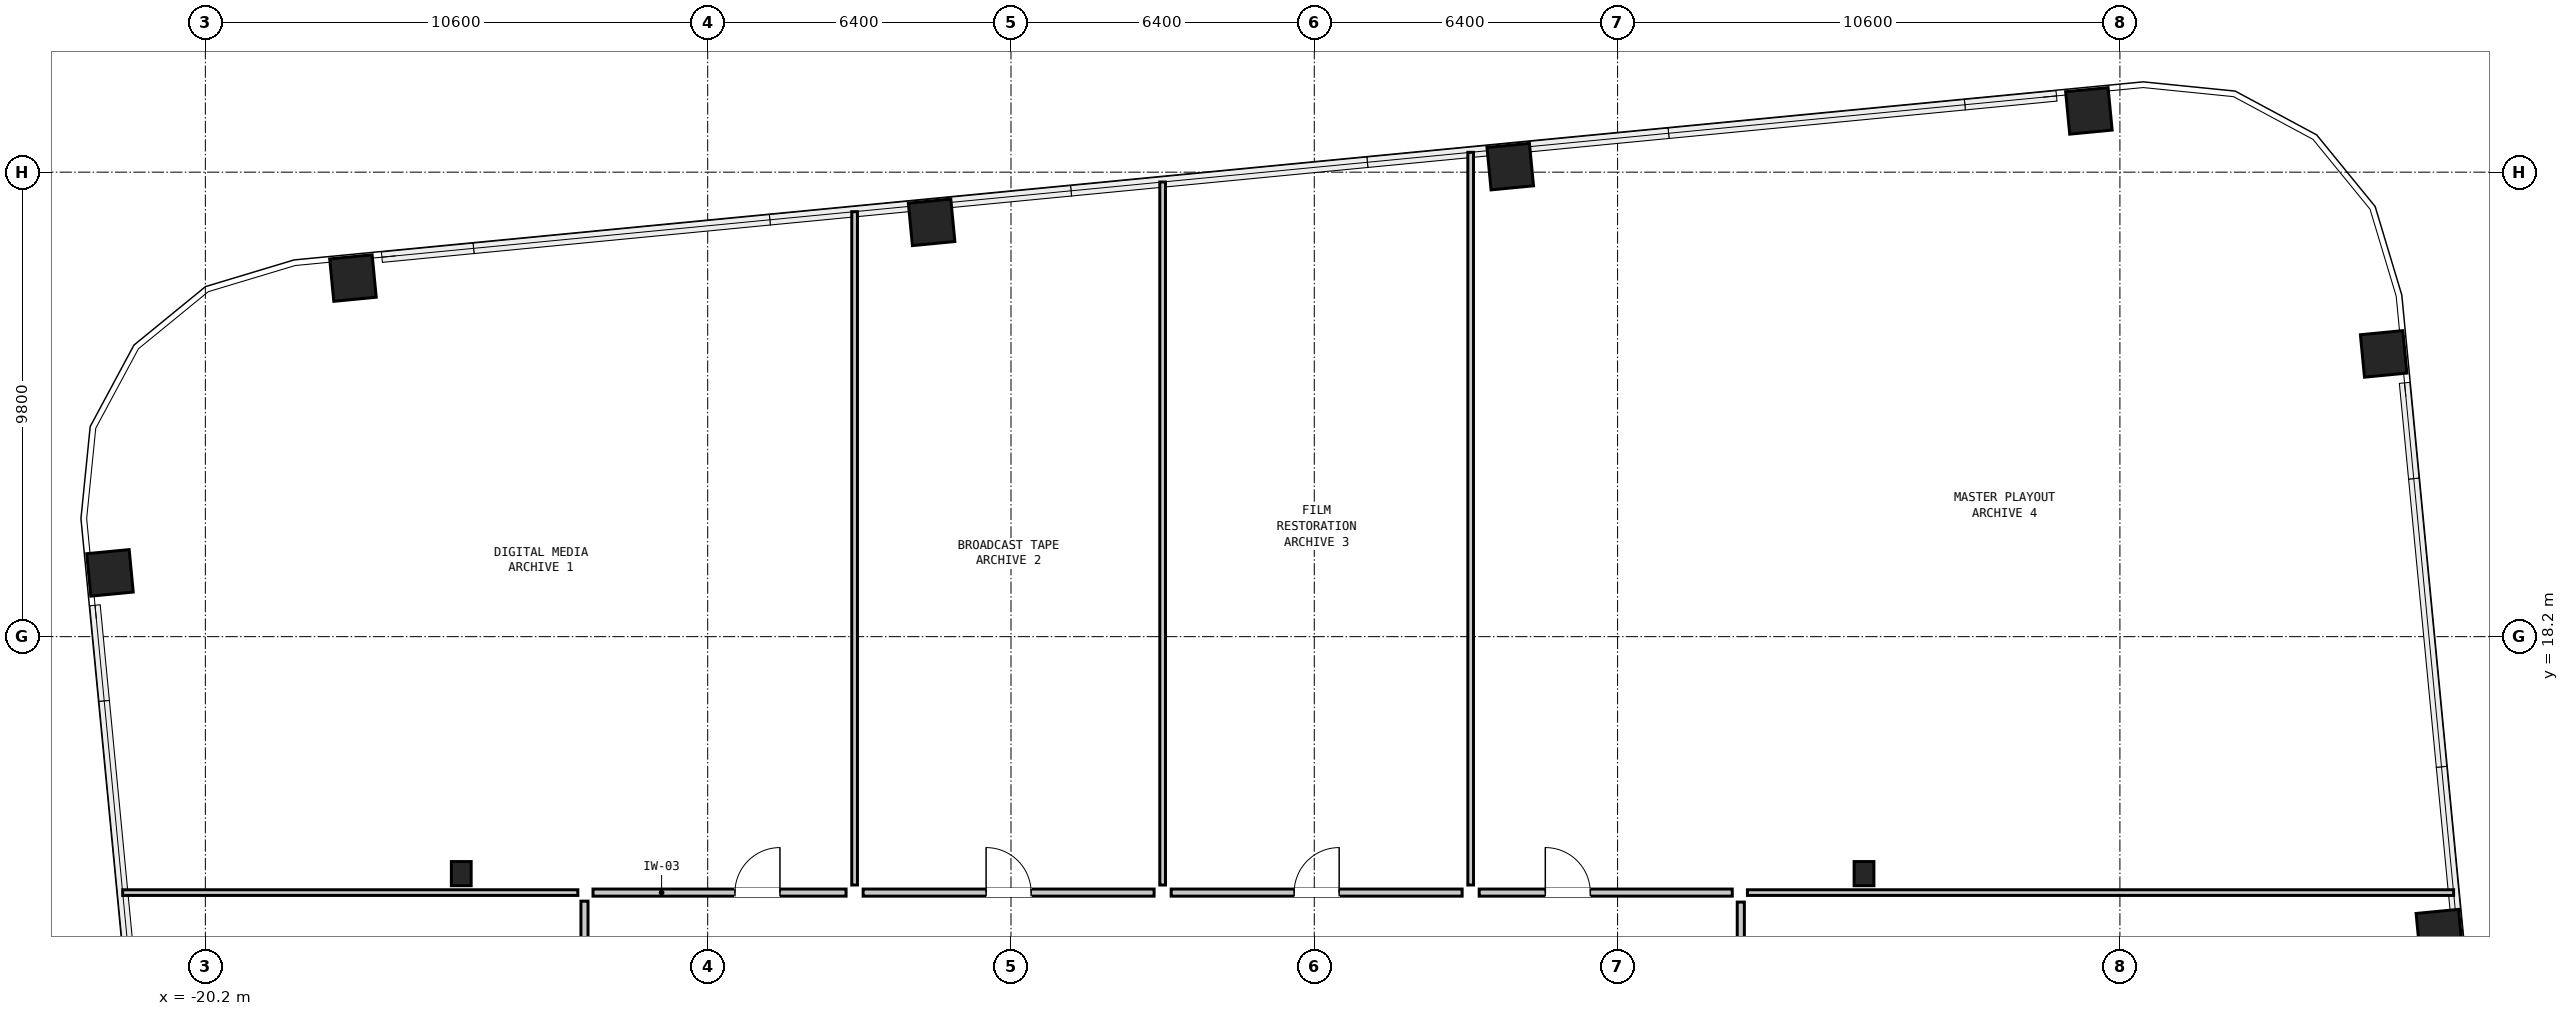
"""IFC4 building model, lengths in metres.
Left out: names, types, materials, properties, quantities, classifications, styles, units other than length and angle.
Written with IfcOpenShell. Run it as: python <this file> out.ifc"""

import sys

from ifc_helpers import new_model, si_unit, direction, frame, frame_2d, origin, origin_2d, place, context, subcontext, project, spatial, rectangle, hollow_rectangle, i_section, extrude, element, fill, save


model = new_model("IFC4")
c1 = context("Model", 3, precision=1e-05, world=origin(), true_north=direction((0.0, 1.0)))
c2 = subcontext(c1, "Body", "Model", "MODEL_VIEW")
j1 = project(units=[si_unit("LENGTHUNIT", "METRE"), si_unit("PLANEANGLEUNIT", "RADIAN")], contexts=[c1])
p1 = place(None, origin())
s1 = spatial("IfcSite", under=j1, at=p1, CompositionType="ELEMENT")
p2 = place(p1, origin())
s2 = spatial("IfcBuilding", under=s1, at=p2, CompositionType="ELEMENT")
p3 = place(p2, frame((0.0, 0.0, 90.8)))
s3 = spatial("IfcBuildingStorey", under=s2, at=p3, CompositionType="ELEMENT", Elevation=90.8)
for number, where, z_axis, x_axis in (
    (1, (26.941, 11.955, 0.0), (0.0, 0.0, 1.0), (-0.096, 0.995, 0.0)),
    (2, (25.765, 24.165, 0.0), (0.0, 0.0, 1.0), (-0.096, 0.995, 0.0)),
    (3, (19.545, 29.292, 0.0), (0.0, 0.0, 1.0), (0.995, 0.096, 0.0)),
    (4, (7.335, 28.117, 0.0), (0.0, 0.0, 1.0), (0.995, 0.096, 0.0)),
    (5, (-4.875, 26.941, 0.0), (0.0, 0.0, 1.0), (0.995, 0.096, 0.0)),
    (6, (-17.085, 25.765, 0.0), (0.0, 0.0, 1.0), (0.995, 0.096, 0.0)),
    (7, (-22.213, 19.545, 0.0), (0.0, 0.0, 1.0), (-0.096, 0.995, 0.0)),
):
    element("IfcColumn", number, at=place(p3, frame(where, z_axis=z_axis, x_axis=x_axis)), inside=s3, PredefinedType="COLUMN", context=c2, shape_type="SweptSolid", body=[
        extrude(hollow_rectangle(XDim=0.9, YDim=0.9, WallThickness=0.055, at=origin_2d()), origin(), (0.0, 0.0, 1.0), 3.05),
    ])
for number, where, z_axis, x_axis in (
    (8, (-14.8, 13.2, 0.0), (0.0, 0.0, 1.0), (1.0, 0.0, 0.0)),
    (9, (14.8, 13.2, 0.0), (0.0, 0.0, 1.0), (1.0, 0.0, 0.0)),
):
    element("IfcColumn", number, at=place(p3, frame(where, z_axis=z_axis, x_axis=x_axis)), inside=s3, PredefinedType="COLUMN", context=c2, shape_type="SweptSolid", body=[
        extrude(i_section(OverallWidth=0.418, OverallDepth=0.51, WebThickness=0.042, FlangeThickness=0.068, at=origin_2d()), origin(), (0.0, 0.0, 1.0), 3.05),
    ])
p4 = place(p3, frame((-21.945, 12.8, 0.0), z_axis=(0.0, 0.0, 1.0), x_axis=(1.0, 0.0, 0.0)))
e10 = element("IfcWall", 10, at=p4, inside=s3, PredefinedType="PARTITIONING", context=c2, shape_type="SweptSolid", body=[
    extrude(rectangle(XDim=9.605, YDim=0.12, at=frame_2d((4.802, 0.0))), origin(), (0.0, 0.0, 1.0), 2.83),
])
p5 = place(p3, frame((12.34, 12.8, 0.0), z_axis=(0.0, 0.0, 1.0), x_axis=(1.0, 0.0, 0.0)))
e11 = element("IfcWall", 11, at=p5, inside=s3, PredefinedType="PARTITIONING", context=c2, shape_type="SweptSolid", body=[
    extrude(rectangle(XDim=14.902, YDim=0.12, at=frame_2d((7.451, 0.0))), origin(), (0.0, 0.0, 1.0), 2.83),
])
p6 = place(p3, frame((-6.5, 12.96, 0.0), z_axis=(0.0, 0.0, 1.0), x_axis=(0.0, 1.0, 0.0)))
e12 = element("IfcWall", 12, at=p6, inside=s3, PredefinedType="PARTITIONING", context=c2, shape_type="SweptSolid", body=[
    extrude(rectangle(XDim=14.207, YDim=0.12, at=frame_2d((7.103, 0.0))), origin(), (0.0, 0.0, 1.0), 2.274),
])
p7 = place(p3, frame((0.0, 12.96, 0.0), z_axis=(0.0, 0.0, 1.0), x_axis=(0.0, 1.0, 0.0)))
e13 = element("IfcWall", 13, at=p7, inside=s3, PredefinedType="PARTITIONING", context=c2, shape_type="SweptSolid", body=[
    extrude(rectangle(XDim=14.833, YDim=0.12, at=frame_2d((7.416, 0.0))), origin(), (0.0, 0.0, 1.0), 2.274),
])
p8 = place(p3, frame((6.5, 12.96, 0.0), z_axis=(0.0, 0.0, 1.0), x_axis=(0.0, 1.0, 0.0)))
e14 = element("IfcWall", 14, at=p8, inside=s3, PredefinedType="PARTITIONING", context=c2, shape_type="SweptSolid", body=[
    extrude(rectangle(XDim=15.458, YDim=0.12, at=frame_2d((7.729, 0.0))), origin(), (0.0, 0.0, 1.0), 2.274),
])
p9 = place(p3, frame((-12.02, 12.8, 0.0), z_axis=(0.0, 0.0, 1.0), x_axis=(1.0, 0.0, 0.0)))
e15 = element("IfcWall", 15, at=p9, inside=s3, PredefinedType="PARTITIONING", context=c2, shape_type="SweptSolid", body=[
    extrude(rectangle(XDim=5.34, YDim=0.15, at=frame_2d((2.67, 0.0))), origin(), (0.0, 0.0, 1.0), 2.83),
])
p10 = place(p9, frame((2.995, 0.0, 0.0)))
e16 = element("IfcOpeningElement", 16, at=p10, cuts=e15, PredefinedType="OPENING", context=c2, shape_type="SweptSolid", body=[
    extrude(rectangle(XDim=0.95, YDim=2.1, at=frame_2d((0.475, 1.05))), frame((0.0, 0.087, 0.0), z_axis=(0.0, -1.0, 0.0), x_axis=(1.0, 0.0, 0.0)), (0.0, 0.0, 1.0), 0.174),
])
p11 = place(p3, frame((-6.32, 12.8, 0.0), z_axis=(0.0, 0.0, 1.0), x_axis=(1.0, 0.0, 0.0)))
e17 = element("IfcWall", 17, at=p11, inside=s3, PredefinedType="PARTITIONING", context=c2, shape_type="SweptSolid", body=[
    extrude(rectangle(XDim=6.14, YDim=0.15, at=frame_2d((3.07, 0.0))), origin(), (0.0, 0.0, 1.0), 2.83),
])
p12 = place(p11, frame((2.595, 0.0, 0.0)))
e18 = element("IfcOpeningElement", 18, at=p12, cuts=e17, PredefinedType="OPENING", context=c2, shape_type="SweptSolid", body=[
    extrude(rectangle(XDim=0.95, YDim=2.1, at=frame_2d((0.475, 1.05))), frame((0.0, 0.087, 0.0), z_axis=(0.0, -1.0, 0.0), x_axis=(1.0, 0.0, 0.0)), (0.0, 0.0, 1.0), 0.174),
])
p13 = place(p3, frame((0.18, 12.8, 0.0), z_axis=(0.0, 0.0, 1.0), x_axis=(1.0, 0.0, 0.0)))
e19 = element("IfcWall", 19, at=p13, inside=s3, PredefinedType="PARTITIONING", context=c2, shape_type="SweptSolid", body=[
    extrude(rectangle(XDim=6.14, YDim=0.15, at=frame_2d((3.07, 0.0))), origin(), (0.0, 0.0, 1.0), 2.83),
])
p14 = place(p13, frame((2.595, 0.0, 0.0)))
e20 = element("IfcOpeningElement", 20, at=p14, cuts=e19, PredefinedType="OPENING", context=c2, shape_type="SweptSolid", body=[
    extrude(rectangle(XDim=0.95, YDim=2.1, at=frame_2d((0.475, 1.05))), frame((0.0, 0.087, 0.0), z_axis=(0.0, -1.0, 0.0), x_axis=(1.0, 0.0, 0.0)), (0.0, 0.0, 1.0), 0.174),
])
p15 = place(p3, frame((6.68, 12.8, 0.0), z_axis=(0.0, 0.0, 1.0), x_axis=(1.0, 0.0, 0.0)))
e21 = element("IfcWall", 21, at=p15, inside=s3, PredefinedType="PARTITIONING", context=c2, shape_type="SweptSolid", body=[
    extrude(rectangle(XDim=5.34, YDim=0.15, at=frame_2d((2.67, 0.0))), origin(), (0.0, 0.0, 1.0), 2.83),
])
p16 = place(p15, frame((1.395, 0.0, 0.0)))
e22 = element("IfcOpeningElement", 22, at=p16, cuts=e21, PredefinedType="OPENING", context=c2, shape_type="SweptSolid", body=[
    extrude(rectangle(XDim=0.95, YDim=2.1, at=frame_2d((0.475, 1.05))), frame((0.0, 0.087, 0.0), z_axis=(0.0, -1.0, 0.0), x_axis=(1.0, 0.0, 0.0)), (0.0, 0.0, 1.0), 0.174),
])
p17 = place(p3, frame((-12.2, 3.68, 0.0), z_axis=(0.0, 0.0, 1.0), x_axis=(0.0, 1.0, 0.0)))
e23 = element("IfcWall", 23, at=p17, inside=s3, PredefinedType="PARTITIONING", context=c2, shape_type="SweptSolid", body=[
    extrude(rectangle(XDim=8.94, YDim=0.15, at=frame_2d((4.47, 0.0))), origin(), (0.0, 0.0, 1.0), 2.83),
])
p18 = place(p17, frame((3.995, 0.0, 0.0)))
e24 = element("IfcOpeningElement", 24, at=p18, cuts=e23, PredefinedType="OPENING", context=c2, shape_type="SweptSolid", body=[
    extrude(rectangle(XDim=0.95, YDim=2.1, at=frame_2d((0.475, 1.05))), frame((0.0, 0.087, 0.0), z_axis=(0.0, -1.0, 0.0), x_axis=(1.0, 0.0, 0.0)), (0.0, 0.0, 1.0), 0.174),
])
p19 = place(p3, frame((12.2, 3.8, 0.0), z_axis=(0.0, 0.0, 1.0), x_axis=(0.0, 1.0, 0.0)))
e25 = element("IfcWall", 25, at=p19, inside=s3, PredefinedType="PARTITIONING", context=c2, shape_type="SweptSolid", body=[
    extrude(rectangle(XDim=8.8, YDim=0.15, at=frame_2d((4.4, 0.0))), origin(), (0.0, 0.0, 1.0), 2.83),
])
p20 = place(p19, frame((3.925, 0.0, 0.0)))
e26 = element("IfcOpeningElement", 26, at=p20, cuts=e25, PredefinedType="OPENING", context=c2, shape_type="SweptSolid", body=[
    extrude(rectangle(XDim=0.95, YDim=2.1, at=frame_2d((0.475, 1.05))), frame((0.0, 0.087, 0.0), z_axis=(0.0, -1.0, 0.0), x_axis=(1.0, 0.0, 0.0)), (0.0, 0.0, 1.0), 0.174),
])
p21 = place(p10, origin())
e27 = element("IfcDoor", 27, at=p21, inside=s3, OperationType="SINGLE_SWING_RIGHT", PredefinedType="DOOR", context=c2, shape_type="SweptSolid", body=[
    extrude(rectangle(XDim=0.95, YDim=2.1, at=frame_2d((0.475, 1.05))), frame((0.0, 0.025, 0.0), z_axis=(0.0, -1.0, 0.0), x_axis=(1.0, 0.0, 0.0)), (0.0, 0.0, 1.0), 0.05),
])
fill(e16, e27)
p22 = place(p12, origin())
e28 = element("IfcDoor", 28, at=p22, inside=s3, OperationType="SINGLE_SWING_LEFT", PredefinedType="DOOR", context=c2, shape_type="SweptSolid", body=[
    extrude(rectangle(XDim=0.95, YDim=2.1, at=frame_2d((0.475, 1.05))), frame((0.0, 0.025, 0.0), z_axis=(0.0, -1.0, 0.0), x_axis=(1.0, 0.0, 0.0)), (0.0, 0.0, 1.0), 0.05),
])
fill(e18, e28)
p23 = place(p14, origin())
e29 = element("IfcDoor", 29, at=p23, inside=s3, OperationType="SINGLE_SWING_RIGHT", PredefinedType="DOOR", context=c2, shape_type="SweptSolid", body=[
    extrude(rectangle(XDim=0.95, YDim=2.1, at=frame_2d((0.475, 1.05))), frame((0.0, 0.025, 0.0), z_axis=(0.0, -1.0, 0.0), x_axis=(1.0, 0.0, 0.0)), (0.0, 0.0, 1.0), 0.05),
])
fill(e20, e29)
p24 = place(p16, origin())
e30 = element("IfcDoor", 30, at=p24, inside=s3, OperationType="SINGLE_SWING_LEFT", PredefinedType="DOOR", context=c2, shape_type="SweptSolid", body=[
    extrude(rectangle(XDim=0.95, YDim=2.1, at=frame_2d((0.475, 1.05))), frame((0.0, 0.025, 0.0), z_axis=(0.0, -1.0, 0.0), x_axis=(1.0, 0.0, 0.0)), (0.0, 0.0, 1.0), 0.05),
])
fill(e22, e30)
save(model, sys.argv[1])
